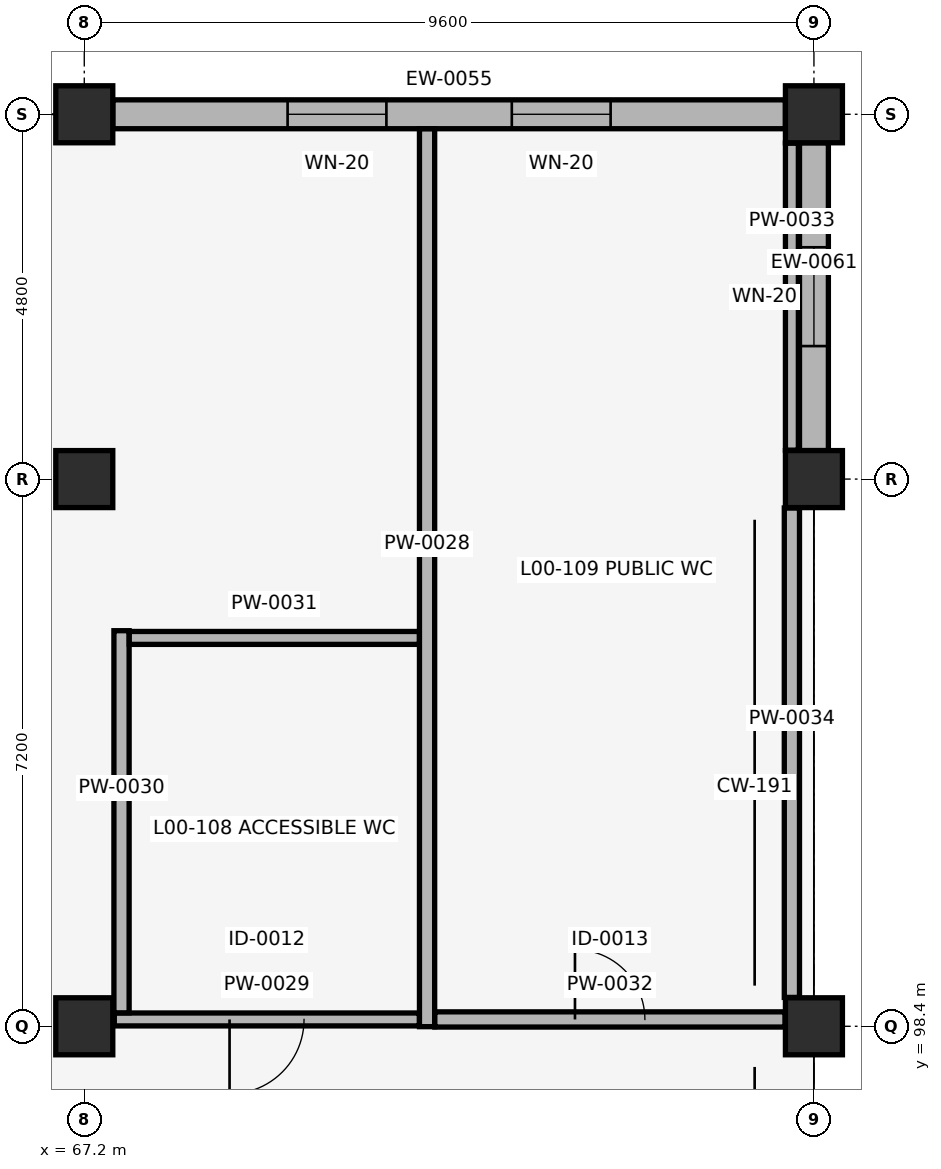
"""IFC4 building model, lengths in metres.
Left out: names, types, materials, properties, quantities, classifications, styles, units other than length and angle.
Written with IfcOpenShell. Run it as: python <this file> out.ifc"""

import sys

from ifc_helpers import new_model, si_unit, direction, frame, frame_2d, origin, origin_2d, place, context, subcontext, project, spatial, rectangle, circle, extrude, element, fill, save


model = new_model("IFC4")
c1 = context("Model", 3, precision=1e-05, world=origin(), true_north=direction((0.0, 1.0)))
c2 = subcontext(c1, "Body", "Model", "MODEL_VIEW")
j1 = project(units=[si_unit("LENGTHUNIT", "METRE"), si_unit("PLANEANGLEUNIT", "RADIAN")], contexts=[c1])
p1 = place(None, origin())
s1 = spatial("IfcSite", under=j1, at=p1, CompositionType="ELEMENT")
p2 = place(p1, origin())
s2 = spatial("IfcBuilding", under=s1, at=p2, CompositionType="ELEMENT")
p3 = place(p2, origin())
s3 = spatial("IfcBuildingStorey", under=s2, at=p3, CompositionType="ELEMENT", Elevation=0.0)
for number, where, z_axis, x_axis in (
    (1, (67.2, 98.4, -0.44), (0.0, 0.0, 1.0), (1.0, 0.0, 0.0)),
    (2, (67.2, 105.6, -0.44), (0.0, 0.0, 1.0), (1.0, 0.0, 0.0)),
    (3, (67.2, 110.4, -0.44), (0.0, 0.0, 1.0), (1.0, 0.0, 0.0)),
    (4, (76.8, 98.4, -0.44), (0.0, 0.0, 1.0), (1.0, 0.0, 0.0)),
    (5, (76.8, 105.6, -0.44), (0.0, 0.0, 1.0), (1.0, 0.0, 0.0)),
    (6, (76.8, 110.4, -0.44), (0.0, 0.0, 1.0), (1.0, 0.0, 0.0)),
):
    element("IfcColumn", number, at=place(p3, frame(where, z_axis=z_axis, x_axis=x_axis)), inside=s3, PredefinedType="COLUMN", context=c2, shape_type="SweptSolid", body=[
        extrude(circle(Radius=0.375, at=origin_2d()), origin(), (0.0, 0.0, 1.0), 4.86),
    ])
p4 = place(p3, frame((76.425, 110.4, 0.0), z_axis=(0.0, 0.0, 1.0), x_axis=(-1.0, 0.0, 0.0)))
e7 = element("IfcWall", 7, at=p4, inside=s3, PredefinedType="SOLIDWALL", context=c2, shape_type="SweptSolid", body=[
    extrude(rectangle(XDim=8.85, YDim=0.38, at=frame_2d((4.425, 0.0))), origin(), (0.0, 0.0, 1.0), 3.42),
])
p5 = place(p4, frame((2.3, 0.0, 0.72)))
e8 = element("IfcOpeningElement", 8, at=p5, cuts=e7, PredefinedType="OPENING", context=c2, shape_type="SweptSolid", body=[
    extrude(rectangle(XDim=1.3, YDim=2.32, at=frame_2d((0.65, 1.16))), frame((0.0, 0.2, 0.0), z_axis=(0.0, -1.0, 0.0), x_axis=(1.0, 0.0, 0.0)), (0.0, 0.0, 1.0), 0.4),
])
p6 = place(p4, frame((5.25, 0.0, 0.72)))
e9 = element("IfcOpeningElement", 9, at=p6, cuts=e7, PredefinedType="OPENING", context=c2, shape_type="SweptSolid", body=[
    extrude(rectangle(XDim=1.3, YDim=2.32, at=frame_2d((0.65, 1.16))), frame((0.0, 0.2, 0.0), z_axis=(0.0, -1.0, 0.0), x_axis=(1.0, 0.0, 0.0)), (0.0, 0.0, 1.0), 0.4),
])
p7 = place(p3, frame((76.8, 105.975, 0.0), z_axis=(0.0, 0.0, 1.0), x_axis=(0.0, 1.0, 0.0)))
e10 = element("IfcWall", 10, at=p7, inside=s3, PredefinedType="SOLIDWALL", context=c2, shape_type="SweptSolid", body=[
    extrude(rectangle(XDim=4.05, YDim=0.38, at=frame_2d((2.025, 0.0))), origin(), (0.0, 0.0, 1.0), 3.42),
])
p8 = place(p7, frame((1.375, 0.0, 0.72)))
e11 = element("IfcOpeningElement", 11, at=p8, cuts=e10, PredefinedType="OPENING", context=c2, shape_type="SweptSolid", body=[
    extrude(rectangle(XDim=1.3, YDim=2.32, at=frame_2d((0.65, 1.16))), frame((0.0, 0.2, 0.0), z_axis=(0.0, -1.0, 0.0), x_axis=(1.0, 0.0, 0.0)), (0.0, 0.0, 1.0), 0.4),
])
p9 = place(p3, frame((71.71, 98.395, 0.0), z_axis=(0.0, 0.0, 1.0), x_axis=(0.0, 1.0, 0.0)))
e12 = element("IfcWall", 12, at=p9, inside=s3, PredefinedType="PLUMBINGWALL", context=c2, shape_type="SweptSolid", body=[
    extrude(rectangle(XDim=11.813, YDim=0.2, at=frame_2d((5.906, 0.0))), origin(), (0.0, 0.0, 1.0), 3.42),
])
p10 = place(p3, frame((67.595, 98.49, 0.0), z_axis=(0.0, 0.0, 1.0), x_axis=(1.0, 0.0, 0.0)))
e13 = element("IfcWall", 13, at=p10, inside=s3, PredefinedType="PLUMBINGWALL", context=c2, shape_type="SweptSolid", body=[
    extrude(rectangle(XDim=4.013, YDim=0.17, at=frame_2d((2.006, 0.0))), origin(), (0.0, 0.0, 1.0), 3.46),
])
p11 = place(p10, frame((1.517, 0.0, 0.0)))
e14 = element("IfcOpeningElement", 14, at=p11, cuts=e13, PredefinedType="OPENING", context=c2, shape_type="SweptSolid", body=[
    extrude(rectangle(XDim=0.98, YDim=2.08, at=frame_2d((0.49, 1.04))), frame((0.0, 0.095, 0.0), z_axis=(0.0, -1.0, 0.0), x_axis=(1.0, 0.0, 0.0)), (0.0, 0.0, 1.0), 0.19),
])
p12 = place(p3, frame((67.69, 98.577, 0.0), z_axis=(0.0, 0.0, 1.0), x_axis=(0.0, 1.0, 0.0)))
e15 = element("IfcWall", 15, at=p12, inside=s3, PredefinedType="PLUMBINGWALL", context=c2, shape_type="SweptSolid", body=[
    extrude(rectangle(XDim=5.028, YDim=0.2, at=frame_2d((2.514, 0.0))), origin(), (0.0, 0.0, 1.0), 3.46),
])
p13 = place(p3, frame((67.792, 103.51, 0.0), z_axis=(0.0, 0.0, 1.0), x_axis=(1.0, 0.0, 0.0)))
e16 = element("IfcWall", 16, at=p13, inside=s3, PredefinedType="PLUMBINGWALL", context=c2, shape_type="SweptSolid", body=[
    extrude(rectangle(XDim=3.816, YDim=0.17, at=frame_2d((1.908, 0.0))), origin(), (0.0, 0.0, 1.0), 3.46),
])
p14 = place(p3, frame((71.812, 98.49, 0.0), z_axis=(0.0, 0.0, 1.0), x_axis=(1.0, 0.0, 0.0)))
e17 = element("IfcWall", 17, at=p14, inside=s3, PredefinedType="PLUMBINGWALL", context=c2, shape_type="SweptSolid", body=[
    extrude(rectangle(XDim=4.608, YDim=0.2, at=frame_2d((2.304, 0.0))), origin(), (0.0, 0.0, 1.0), 3.46),
])
p15 = place(p14, frame((1.844, 0.0, 0.0)))
e18 = element("IfcOpeningElement", 18, at=p15, cuts=e17, PredefinedType="OPENING", context=c2, shape_type="SweptSolid", body=[
    extrude(rectangle(XDim=0.92, YDim=2.08, at=frame_2d((0.46, 1.04))), frame((0.0, 0.11, 0.0), z_axis=(0.0, -1.0, 0.0), x_axis=(1.0, 0.0, 0.0)), (0.0, 0.0, 1.0), 0.22),
])
p16 = place(p3, frame((76.51, 105.98, 0.0), z_axis=(0.0, 0.0, 1.0), x_axis=(0.0, 1.0, 0.0)))
e19 = element("IfcWall", 19, at=p16, inside=s3, PredefinedType="PLUMBINGWALL", context=c2, shape_type="SweptSolid", body=[
    extrude(rectangle(XDim=4.04, YDim=0.17, at=frame_2d((2.02, 0.0))), origin(), (0.0, 0.0, 1.0), 3.46),
])
p17 = place(p3, frame((76.51, 98.78, 0.0), z_axis=(0.0, 0.0, 1.0), x_axis=(0.0, 1.0, 0.0)))
e20 = element("IfcWall", 20, at=p17, inside=s3, PredefinedType="PLUMBINGWALL", context=c2, shape_type="SweptSolid", body=[
    extrude(rectangle(XDim=6.44, YDim=0.2, at=frame_2d((3.22, 0.0))), origin(), (0.0, 0.0, 1.0), 3.46),
])
p18 = place(p5, origin())
e21 = element("IfcWindow", 21, at=p18, inside=s3, PartitioningType="SINGLE_PANEL", PredefinedType="WINDOW", context=c2, shape_type="SweptSolid", body=[
    extrude(rectangle(XDim=1.3, YDim=2.32, at=frame_2d((0.65, 1.16))), frame((0.0, 0.03, 0.0), z_axis=(0.0, -1.0, 0.0), x_axis=(1.0, 0.0, 0.0)), (0.0, 0.0, 1.0), 0.06),
])
fill(e8, e21)
p19 = place(p6, origin())
e22 = element("IfcWindow", 22, at=p19, inside=s3, PartitioningType="SINGLE_PANEL", PredefinedType="WINDOW", context=c2, shape_type="SweptSolid", body=[
    extrude(rectangle(XDim=1.3, YDim=2.32, at=frame_2d((0.65, 1.16))), frame((0.0, 0.03, 0.0), z_axis=(0.0, -1.0, 0.0), x_axis=(1.0, 0.0, 0.0)), (0.0, 0.0, 1.0), 0.06),
])
fill(e9, e22)
p20 = place(p8, origin())
e23 = element("IfcWindow", 23, at=p20, inside=s3, PartitioningType="SINGLE_PANEL", PredefinedType="WINDOW", context=c2, shape_type="SweptSolid", body=[
    extrude(rectangle(XDim=1.3, YDim=2.32, at=frame_2d((0.65, 1.16))), frame((0.0, 0.03, 0.0), z_axis=(0.0, -1.0, 0.0), x_axis=(1.0, 0.0, 0.0)), (0.0, 0.0, 1.0), 0.06),
])
fill(e11, e23)
p21 = place(p11, origin())
e24 = element("IfcDoor", 24, at=p21, inside=s3, OperationType="SINGLE_SWING_RIGHT", PredefinedType="DOOR", context=c2, shape_type="SweptSolid", body=[
    extrude(rectangle(XDim=0.98, YDim=2.08, at=frame_2d((0.49, 1.04))), frame((0.0, 0.025, 0.0), z_axis=(0.0, -1.0, 0.0), x_axis=(1.0, 0.0, 0.0)), (0.0, 0.0, 1.0), 0.05),
])
fill(e14, e24)
p22 = place(p15, origin())
e25 = element("IfcDoor", 25, at=p22, inside=s3, OperationType="SINGLE_SWING_LEFT", PredefinedType="DOOR", context=c2, shape_type="SweptSolid", body=[
    extrude(rectangle(XDim=0.92, YDim=2.08, at=frame_2d((0.46, 1.04))), frame((0.0, 0.025, 0.0), z_axis=(0.0, -1.0, 0.0), x_axis=(1.0, 0.0, 0.0)), (0.0, 0.0, 1.0), 0.05),
])
fill(e18, e25)
save(model, sys.argv[1])
